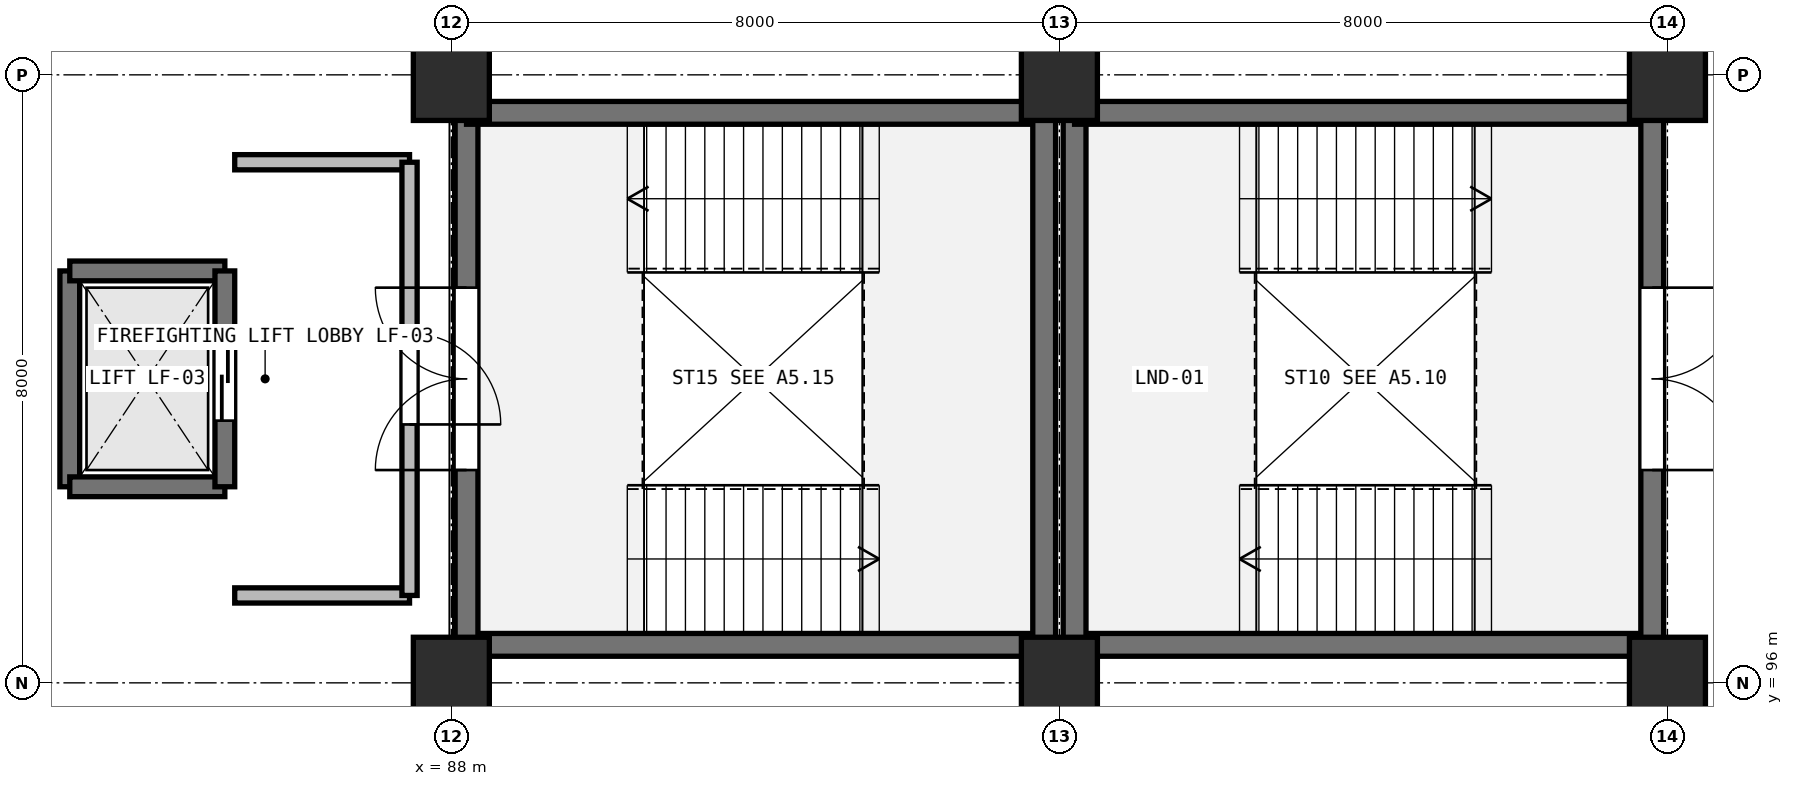
"""IFC4 building model, lengths in metres.
Left out: names, types, materials, properties, quantities, classifications, styles, units other than length and angle.
Written with IfcOpenShell. Run it as: python <this file> out.ifc"""

import sys

from ifc_helpers import new_model, si_unit, direction, frame, frame_2d, origin, origin_2d, place, context, subcontext, project, spatial, rectangle, extrude, element, fill, save


model = new_model("IFC4")
c1 = context("Model", 3, precision=1e-05, world=origin(), true_north=direction((0.0, 1.0)))
c2 = subcontext(c1, "Body", "Model", "MODEL_VIEW")
j1 = project(units=[si_unit("LENGTHUNIT", "METRE"), si_unit("PLANEANGLEUNIT", "RADIAN")], contexts=[c1])
p1 = place(None, origin())
s1 = spatial("IfcSite", under=j1, at=p1, CompositionType="ELEMENT")
p2 = place(p1, origin())
s2 = spatial("IfcBuilding", under=s1, at=p2, CompositionType="ELEMENT")
p3 = place(p2, frame((0.0, 0.0, 10.2)))
s3 = spatial("IfcBuildingStorey", under=s2, at=p3, CompositionType="ELEMENT", Elevation=10.2)
for number, where, z_axis, x_axis in (
    (1, (88.0, 96.0, 0.0), (0.0, 0.0, 1.0), (1.0, 0.0, 0.0)),
    (2, (88.0, 104.0, 0.0), (0.0, 0.0, 1.0), (1.0, 0.0, 0.0)),
    (3, (96.0, 96.0, 0.0), (0.0, 0.0, 1.0), (1.0, 0.0, 0.0)),
    (4, (96.0, 104.0, 0.0), (0.0, 0.0, 1.0), (1.0, 0.0, 0.0)),
    (5, (104.0, 96.0, 0.0), (0.0, 0.0, 1.0), (1.0, 0.0, 0.0)),
    (6, (104.0, 104.0, 0.0), (0.0, 0.0, 1.0), (1.0, 0.0, 0.0)),
):
    element("IfcColumn", number, at=place(p3, frame(where, z_axis=z_axis, x_axis=x_axis)), inside=s3, PredefinedType="COLUMN", context=c2, shape_type="SweptSolid", body=[
        extrude(rectangle(XDim=1.0, YDim=1.2, at=origin_2d()), origin(), (0.0, 0.0, 1.0), 4.8),
    ])
p4 = place(p3, frame((103.8, 96.5, 0.0), z_axis=(0.0, 0.0, 1.0), x_axis=(-1.0, 0.0, 0.0)))
e7 = element("IfcWall", 7, at=p4, inside=s3, PredefinedType="SHEAR", context=c2, shape_type="SweptSolid", body=[
    extrude(rectangle(XDim=7.6, YDim=0.3, at=frame_2d((3.8, 0.0))), origin(), (0.0, 0.0, 1.0), 4.46),
])
p5 = place(p3, frame((96.2, 96.5, 0.0), z_axis=(0.0, 0.0, 1.0), x_axis=(0.0, 1.0, 0.0)))
e8 = element("IfcWall", 8, at=p5, inside=s3, PredefinedType="SHEAR", context=c2, shape_type="SweptSolid", body=[
    extrude(rectangle(XDim=7.0, YDim=0.3, at=frame_2d((3.5, 0.0))), origin(), (0.0, 0.0, 1.0), 4.46),
])
p6 = place(p3, frame((96.2, 103.5, 0.0), z_axis=(0.0, 0.0, 1.0), x_axis=(1.0, 0.0, 0.0)))
e9 = element("IfcWall", 9, at=p6, inside=s3, PredefinedType="SHEAR", context=c2, shape_type="SweptSolid", body=[
    extrude(rectangle(XDim=7.6, YDim=0.3, at=frame_2d((3.8, 0.0))), origin(), (0.0, 0.0, 1.0), 4.46),
])
p7 = place(p3, frame((103.8, 103.5, 0.0), z_axis=(0.0, 0.0, 1.0), x_axis=(0.0, -1.0, 0.0)))
e10 = element("IfcWall", 10, at=p7, inside=s3, PredefinedType="SHEAR", context=c2, shape_type="SweptSolid", body=[
    extrude(rectangle(XDim=7.0, YDim=0.3, at=frame_2d((3.5, 0.0))), origin(), (0.0, 0.0, 1.0), 4.46),
])
p8 = place(p7, frame((2.3, 0.0, 0.0)))
e11 = element("IfcOpeningElement", 11, at=p8, cuts=e10, PredefinedType="OPENING", context=c2, shape_type="SweptSolid", body=[
    extrude(rectangle(XDim=2.4, YDim=2.2, at=frame_2d((1.2, 1.1))), frame((0.0, 0.16, 0.0), z_axis=(0.0, -1.0, 0.0), x_axis=(1.0, 0.0, 0.0)), (0.0, 0.0, 1.0), 0.32),
])
p9 = place(p3, frame((95.8, 96.5, 0.0), z_axis=(0.0, 0.0, 1.0), x_axis=(-1.0, 0.0, 0.0)))
e12 = element("IfcWall", 12, at=p9, inside=s3, PredefinedType="SHEAR", context=c2, shape_type="SweptSolid", body=[
    extrude(rectangle(XDim=7.6, YDim=0.3, at=frame_2d((3.8, 0.0))), origin(), (0.0, 0.0, 1.0), 4.46),
])
p10 = place(p3, frame((88.2, 96.5, 0.0), z_axis=(0.0, 0.0, 1.0), x_axis=(0.0, 1.0, 0.0)))
e13 = element("IfcWall", 13, at=p10, inside=s3, PredefinedType="SHEAR", context=c2, shape_type="SweptSolid", body=[
    extrude(rectangle(XDim=7.0, YDim=0.3, at=frame_2d((3.5, 0.0))), origin(), (0.0, 0.0, 1.0), 4.46),
])
p11 = place(p10, frame((2.3, 0.0, 0.0)))
e14 = element("IfcOpeningElement", 14, at=p11, cuts=e13, PredefinedType="OPENING", context=c2, shape_type="SweptSolid", body=[
    extrude(rectangle(XDim=2.4, YDim=2.2, at=frame_2d((1.2, 1.1))), frame((0.0, 0.16, 0.0), z_axis=(0.0, -1.0, 0.0), x_axis=(1.0, 0.0, 0.0)), (0.0, 0.0, 1.0), 0.32),
])
p12 = place(p3, frame((88.2, 103.5, 0.0), z_axis=(0.0, 0.0, 1.0), x_axis=(1.0, 0.0, 0.0)))
e15 = element("IfcWall", 15, at=p12, inside=s3, PredefinedType="SHEAR", context=c2, shape_type="SweptSolid", body=[
    extrude(rectangle(XDim=7.6, YDim=0.3, at=frame_2d((3.8, 0.0))), origin(), (0.0, 0.0, 1.0), 4.46),
])
p13 = place(p3, frame((95.8, 103.5, 0.0), z_axis=(0.0, 0.0, 1.0), x_axis=(0.0, -1.0, 0.0)))
e16 = element("IfcWall", 16, at=p13, inside=s3, PredefinedType="SHEAR", context=c2, shape_type="SweptSolid", body=[
    extrude(rectangle(XDim=7.0, YDim=0.3, at=frame_2d((3.5, 0.0))), origin(), (0.0, 0.0, 1.0), 4.46),
])
p14 = place(p3, frame((82.98, 98.58, 0.0), z_axis=(0.0, 0.0, 1.0), x_axis=(0.0, 1.0, 0.0)))
e17 = element("IfcWall", 17, at=p14, inside=s3, PredefinedType="SHEAR", context=c2, shape_type="SweptSolid", body=[
    extrude(rectangle(XDim=2.84, YDim=0.26, at=frame_2d((1.42, 0.0))), origin(), (0.0, 0.0, 1.0), 4.46),
])
for number, where, z_axis, x_axis in (
    (18, (82.98, 101.42, 0.0), (0.0, 0.0, 1.0), (1.0, 0.0, 0.0)),
    (19, (85.02, 98.58, 0.0), (0.0, 0.0, 1.0), (-1.0, 0.0, 0.0)),
):
    element("IfcWall", number, at=place(p3, frame(where, z_axis=z_axis, x_axis=x_axis)), inside=s3, PredefinedType="SHEAR", context=c2, shape_type="SweptSolid", body=[
        extrude(rectangle(XDim=2.04, YDim=0.26, at=frame_2d((1.02, 0.0))), origin(), (0.0, 0.0, 1.0), 4.46),
    ])
p15 = place(p3, frame((85.02, 101.42, 0.0), z_axis=(0.0, 0.0, 1.0), x_axis=(0.0, -1.0, 0.0)))
e20 = element("IfcWall", 20, at=p15, inside=s3, PredefinedType="SHEAR", context=c2, shape_type="SweptSolid", body=[
    extrude(rectangle(XDim=2.84, YDim=0.26, at=frame_2d((1.42, 0.0))), origin(), (0.0, 0.0, 1.0), 4.46),
])
p16 = place(p15, frame((0.87, 0.0, 0.0)))
e21 = element("IfcOpeningElement", 21, at=p16, cuts=e20, PredefinedType="OPENING", context=c2, shape_type="SweptSolid", body=[
    extrude(rectangle(XDim=1.1, YDim=2.15, at=frame_2d((0.55, 1.075))), frame((0.0, 0.14, 0.0), z_axis=(0.0, -1.0, 0.0), x_axis=(1.0, 0.0, 0.0)), (0.0, 0.0, 1.0), 0.28),
])
for number, where, z_axis, x_axis in (
    (22, (85.15, 102.85, 0.0), (0.0, 0.0, 1.0), (1.0, 0.0, 0.0)),
    (23, (87.45, 97.15, 0.0), (0.0, 0.0, 1.0), (-1.0, 0.0, 0.0)),
):
    element("IfcWall", number, at=place(p3, frame(where, z_axis=z_axis, x_axis=x_axis)), inside=s3, PredefinedType="PARTITIONING", context=c2, shape_type="SweptSolid", body=[
        extrude(rectangle(XDim=2.3, YDim=0.2, at=frame_2d((1.15, 0.0))), origin(), (0.0, 0.0, 1.0), 4.46),
    ])
p17 = place(p3, frame((87.45, 102.85, 0.0), z_axis=(0.0, 0.0, 1.0), x_axis=(0.0, -1.0, 0.0)))
e24 = element("IfcWall", 24, at=p17, inside=s3, PredefinedType="PARTITIONING", context=c2, shape_type="SweptSolid", body=[
    extrude(rectangle(XDim=5.7, YDim=0.2, at=frame_2d((2.85, 0.0))), origin(), (0.0, 0.0, 1.0), 3.6),
])
p18 = place(p17, frame((2.25, 0.0, 0.0)))
e25 = element("IfcOpeningElement", 25, at=p18, cuts=e24, PredefinedType="OPENING", context=c2, shape_type="SweptSolid", body=[
    extrude(rectangle(XDim=1.2, YDim=2.2, at=frame_2d((0.6, 1.1))), frame((0.0, 0.11, 0.0), z_axis=(0.0, -1.0, 0.0), x_axis=(1.0, 0.0, 0.0)), (0.0, 0.0, 1.0), 0.22),
])
p19 = place(p8, frame((2.4, 0.0, 0.0), z_axis=(0.0, 0.0, 1.0), x_axis=(-1.0, 0.0, 0.0)))
e26 = element("IfcDoor", 26, at=p19, inside=s3, OperationType="DOUBLE_DOOR_SINGLE_SWING", PredefinedType="DOOR", context=c2, shape_type="SweptSolid", body=[
    extrude(rectangle(XDim=2.4, YDim=2.2, at=frame_2d((1.2, 1.1))), frame((0.0, 0.025, 0.0), z_axis=(0.0, -1.0, 0.0), x_axis=(1.0, 0.0, 0.0)), (0.0, 0.0, 1.0), 0.05),
])
fill(e11, e26)
p20 = place(p11, frame((2.4, 0.0, 0.0), z_axis=(0.0, 0.0, 1.0), x_axis=(-1.0, 0.0, 0.0)))
e27 = element("IfcDoor", 27, at=p20, inside=s3, OperationType="DOUBLE_DOOR_SINGLE_SWING", PredefinedType="DOOR", context=c2, shape_type="SweptSolid", body=[
    extrude(rectangle(XDim=2.4, YDim=2.2, at=frame_2d((1.2, 1.1))), frame((0.0, 0.025, 0.0), z_axis=(0.0, -1.0, 0.0), x_axis=(1.0, 0.0, 0.0)), (0.0, 0.0, 1.0), 0.05),
])
fill(e14, e27)
p21 = place(p16, origin())
e28 = element("IfcDoor", 28, at=p21, inside=s3, OperationType="SLIDING_TO_LEFT", PredefinedType="DOOR", context=c2, shape_type="SweptSolid", body=[
    extrude(rectangle(XDim=1.1, YDim=2.15, at=frame_2d((0.55, 1.075))), frame((0.0, 0.025, 0.0), z_axis=(0.0, -1.0, 0.0), x_axis=(1.0, 0.0, 0.0)), (0.0, 0.0, 1.0), 0.05),
])
fill(e21, e28)
p22 = place(p18, origin())
e29 = element("IfcDoor", 29, at=p22, inside=s3, OperationType="SINGLE_SWING_RIGHT", PredefinedType="DOOR", context=c2, shape_type="SweptSolid", body=[
    extrude(rectangle(XDim=1.2, YDim=2.2, at=frame_2d((0.6, 1.1))), frame((0.0, 0.025, 0.0), z_axis=(0.0, -1.0, 0.0), x_axis=(1.0, 0.0, 0.0)), (0.0, 0.0, 1.0), 0.05),
])
fill(e25, e29)
save(model, sys.argv[1])
